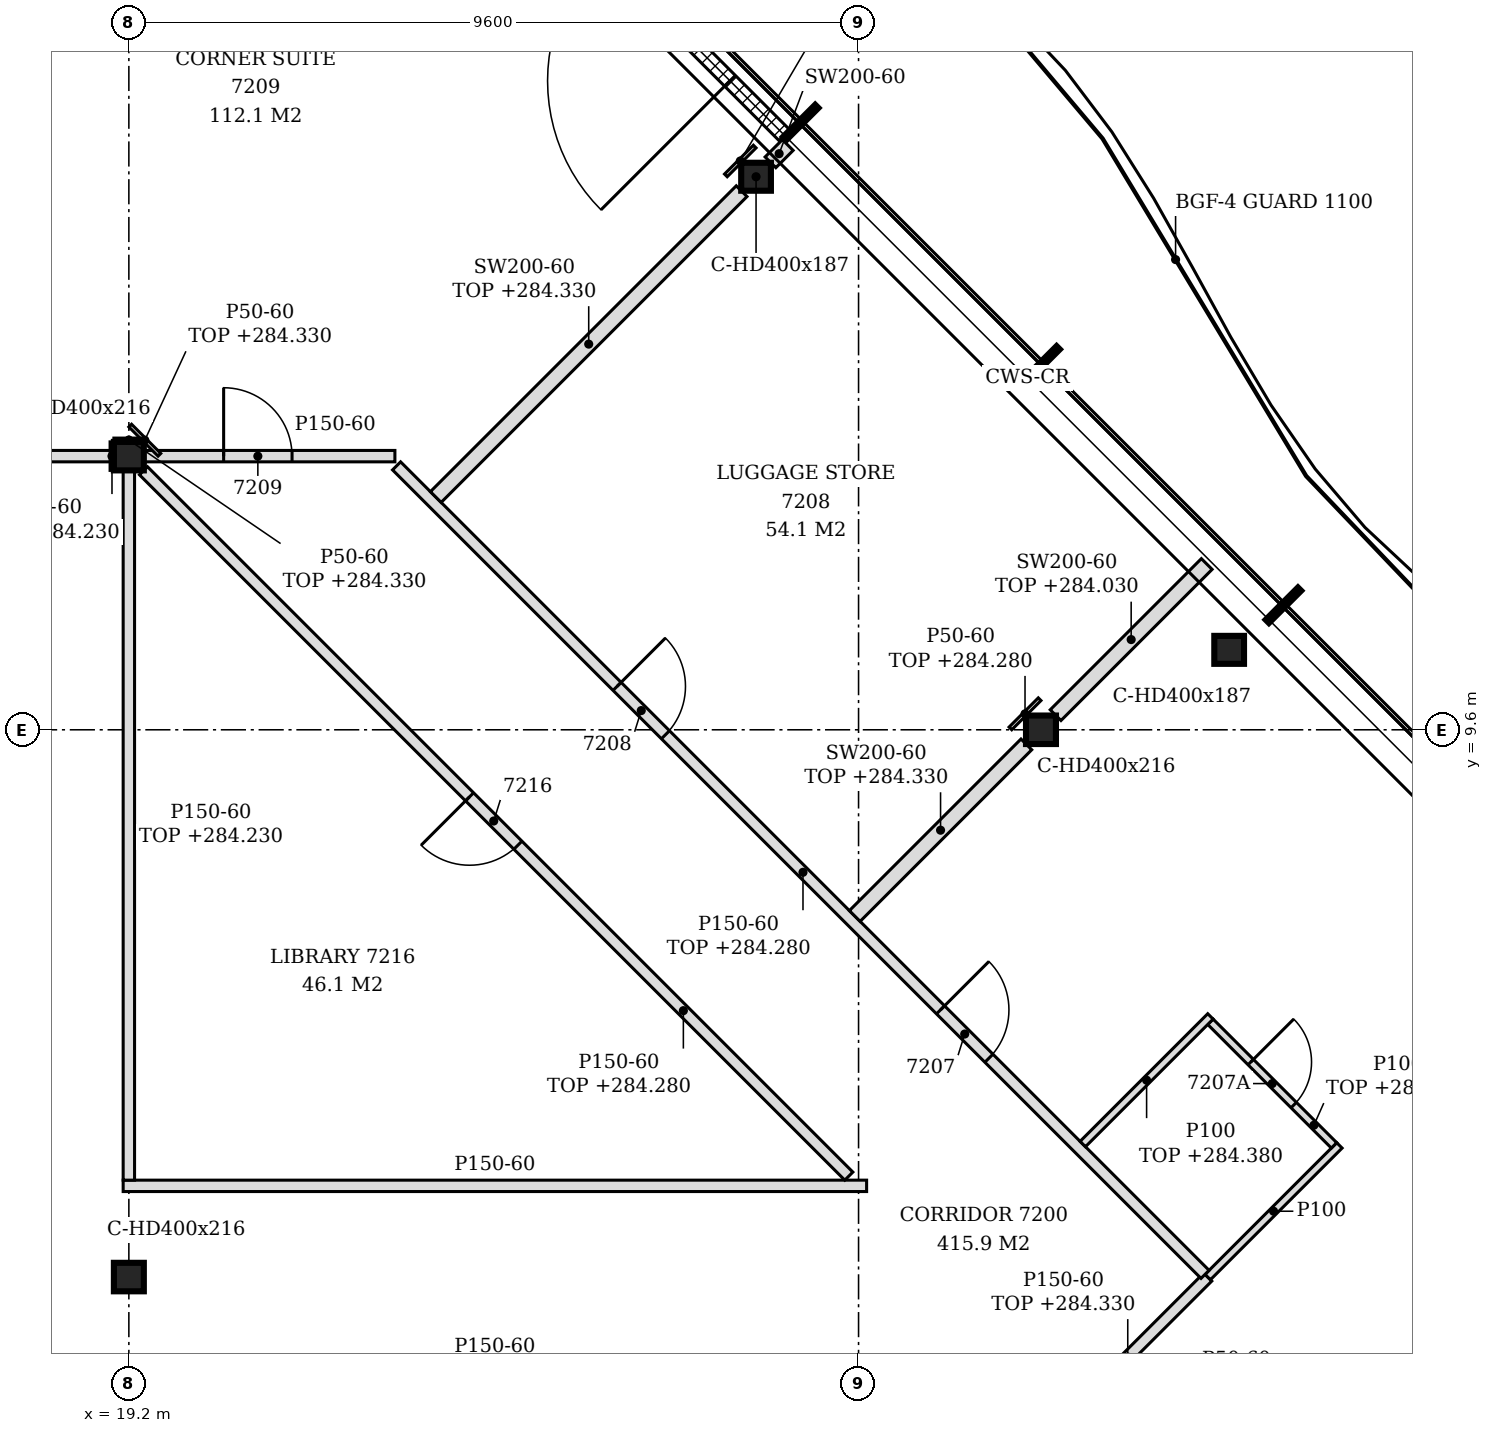
"""IFC4 building model, lengths in metres.
Left out: names, types, materials, properties, quantities, classifications, styles, units other than length and angle.
Written with IfcOpenShell. Run it as: python <this file> out.ifc"""

import sys

from ifc_helpers import new_model, si_unit, direction, frame, frame_2d, origin, origin_2d, place, context, subcontext, project, spatial, polyline, rectangle, i_section, outline, extrude, element, fill, save


model = new_model("IFC4")
c1 = context("Model", 3, precision=1e-05, world=origin(), true_north=direction((0.0, 1.0)))
c2 = subcontext(c1, "Body", "Model", "MODEL_VIEW")
j1 = project(units=[si_unit("LENGTHUNIT", "METRE"), si_unit("PLANEANGLEUNIT", "RADIAN")], contexts=[c1])
p1 = place(None, origin())
s1 = spatial("IfcSite", under=j1, at=p1, CompositionType="ELEMENT")
p2 = place(p1, origin())
s2 = spatial("IfcBuilding", under=s1, at=p2, CompositionType="ELEMENT")
p3 = place(p2, frame((0.0, 0.0, 281.4)))
s3 = spatial("IfcBuildingStorey", under=s2, at=p3, CompositionType="ELEMENT", Elevation=281.4)
for number, where, z_axis, x_axis in (
    (1, (33.676, 10.652, -0.15), (0.0, 0.0, 1.0), (1.0, 0.0, 0.0)),
    (2, (27.451, 16.876, -0.15), (0.0, 0.0, 1.0), (1.0, 0.0, 0.0)),
):
    element("IfcColumn", number, at=place(p3, frame(where, z_axis=z_axis, x_axis=x_axis)), inside=s3, PredefinedType="COLUMN", context=c2, shape_type="SweptSolid", body=[
        extrude(i_section(OverallWidth=0.391, OverallDepth=0.368, WebThickness=0.015, FlangeThickness=0.024, FilletRadius=0.015, at=origin_2d()), origin(), (0.0, 0.0, 1.0), 3.6),
    ])
for number, where, z_axis, x_axis in (
    (3, (19.2, 2.4, -0.15), (0.0, 0.0, 1.0), (1.0, 0.0, 0.0)),
    (4, (19.2, 13.2, -0.15), (0.0, 0.0, 1.0), (1.0, 0.0, 0.0)),
    (5, (31.2, 9.6, -0.15), (0.0, 0.0, 1.0), (1.0, 0.0, 0.0)),
):
    element("IfcColumn", number, at=place(p3, frame(where, z_axis=z_axis, x_axis=x_axis)), inside=s3, PredefinedType="COLUMN", context=c2, shape_type="SweptSolid", body=[
        extrude(i_section(OverallWidth=0.394, OverallDepth=0.375, WebThickness=0.017, FlangeThickness=0.028, FilletRadius=0.015, at=origin_2d()), origin(), (0.0, 0.0, 1.0), 3.6),
    ])
p4 = place(p3, frame((27.826, 17.42, 0.0), z_axis=(0.0, 0.0, 1.0), x_axis=(-0.707079231393, 0.707134329907, 0.0)))
e6 = element("IfcWall", 6, at=p4, inside=s3, PredefinedType="NOTDEFINED", context=c2, shape_type="SweptSolid", body=[
    extrude(rectangle(XDim=4.431, YDim=0.2, at=frame_2d((2.215, 0.0))), origin(), (0.0, 0.0, 1.0), 3.45),
])
p5 = place(p4, frame((1.015, 0.0, 0.0)))
e7 = element("IfcOpeningElement", 7, at=p5, cuts=e6, PredefinedType="OPENING", context=c2, shape_type="SweptSolid", body=[
    extrude(rectangle(XDim=2.4, YDim=2.4, at=frame_2d((1.2, 1.2))), frame((0.0, 0.11, 0.0), z_axis=(0.0, -1.0, 0.0), x_axis=(1.0, 0.0, 0.0)), (0.0, 0.0, 1.0), 0.22),
])
p6 = place(p3, frame((31.289, 0.295, 0.0), z_axis=(0.0, 0.0, 1.0), x_axis=(0.707147793093, 0.707065766902, 0.0)))
e8 = element("IfcWall", 8, at=p6, inside=s3, PredefinedType="PARTITIONING", context=c2, shape_type="SweptSolid", body=[
    extrude(rectangle(XDim=2.976, YDim=0.15, at=frame_2d((1.488, 0.0))), origin(), (0.0, 0.0, 1.0), 2.93),
])
p7 = place(p3, frame((33.394, 2.4, 0.0), z_axis=(0.0, 0.0, 1.0), x_axis=(0.707056951598, 0.707156607264, 0.0)))
e9 = element("IfcWall", 9, at=p7, inside=s3, PredefinedType="PARTITIONING", context=c2, shape_type="SweptSolid", body=[
    extrude(rectangle(XDim=2.45, YDim=0.1, at=frame_2d((1.225, 0.0))), origin(), (0.0, 0.0, 1.0), 3.45),
])
p8 = place(p3, frame((33.359, 2.435, 0.0), z_axis=(0.0, 0.0, 1.0), x_axis=(-0.707098666068, 0.707114896212, 0.0)))
e10 = element("IfcWall", 10, at=p8, inside=s3, PredefinedType="PARTITIONING", context=c2, shape_type="SweptSolid", body=[
    extrude(rectangle(XDim=15.042, YDim=0.15, at=frame_2d((7.521, 0.0))), origin(), (0.0, 0.0, 1.0), 2.88),
])
p9 = place(p8, frame((4.021, 0.0, 0.0)))
e11 = element("IfcOpeningElement", 11, at=p9, cuts=e10, PredefinedType="OPENING", context=c2, shape_type="SweptSolid", body=[
    extrude(rectangle(XDim=0.9, YDim=2.1, at=frame_2d((0.45, 1.05))), frame((0.0, 0.085, 0.0), z_axis=(0.0, -1.0, 0.0), x_axis=(1.0, 0.0, 0.0)), (0.0, 0.0, 1.0), 0.17),
])
p10 = place(p8, frame((10.04, 0.0, 0.0)))
e12 = element("IfcOpeningElement", 12, at=p10, cuts=e10, PredefinedType="OPENING", context=c2, shape_type="SweptSolid", body=[
    extrude(rectangle(XDim=0.9, YDim=2.1, at=frame_2d((0.45, 1.05))), frame((0.0, 0.085, 0.0), z_axis=(0.0, -1.0, 0.0), x_axis=(1.0, 0.0, 0.0)), (0.0, 0.0, 1.0), 0.17),
])
p11 = place(p3, frame((19.125, 3.6, 0.0), z_axis=(0.0, 0.0, 1.0), x_axis=(1.0, 0.0, 0.0)))
e13 = element("IfcWall", 13, at=p11, inside=s3, PredefinedType="PARTITIONING", context=c2, shape_type="SweptSolid", body=[
    extrude(outline(polyline([(0.0, 0.0), (9.781, 0.0), (9.781, 3.45), (0.225, 3.45), (0.223, 2.83), (0.0, 2.83), (0.0, 0.0)])), frame((0.0, 0.075, 0.0), z_axis=(0.0, -1.0, 0.0), x_axis=(1.0, 0.0, 0.0)), (0.0, 0.0, 1.0), 0.15),
])
p12 = place(p3, frame((19.2, 3.675, 0.0), z_axis=(0.0, 0.0, 1.0), x_axis=(0.0, 1.0, 0.0)))
e14 = element("IfcWall", 14, at=p12, inside=s3, PredefinedType="PARTITIONING", context=c2, shape_type="SweptSolid", body=[
    extrude(rectangle(XDim=9.337, YDim=0.15, at=frame_2d((4.669, 0.0))), origin(), (0.0, 0.0, 1.0), 2.83),
])
p13 = place(p3, frame((28.672, 3.728, 0.0), z_axis=(0.0, 0.0, 1.0), x_axis=(-0.707106781187, 0.707106781187, 0.0)))
e15 = element("IfcWall", 15, at=p13, inside=s3, PredefinedType="PARTITIONING", context=c2, shape_type="SweptSolid", body=[
    extrude(rectangle(XDim=13.124, YDim=0.15, at=frame_2d((6.562, 0.0))), origin(), (0.0, 0.0, 1.0), 2.88),
])
p14 = place(p13, frame((6.157, 0.0, 0.0)))
e16 = element("IfcOpeningElement", 16, at=p14, cuts=e15, PredefinedType="OPENING", context=c2, shape_type="SweptSolid", body=[
    extrude(rectangle(XDim=0.9, YDim=2.1, at=frame_2d((0.45, 1.05))), frame((0.0, 0.085, 0.0), z_axis=(0.0, -1.0, 0.0), x_axis=(1.0, 0.0, 0.0)), (0.0, 0.0, 1.0), 0.17),
])
p15 = place(p3, frame((35.056, 4.132, 0.0), z_axis=(0.0, 0.0, 1.0), x_axis=(-0.707106781187, 0.707106781187, 0.0)))
e17 = element("IfcWall", 17, at=p15, inside=s3, PredefinedType="PARTITIONING", context=c2, shape_type="SweptSolid", body=[
    extrude(rectangle(XDim=2.3, YDim=0.1, at=frame_2d((1.15, 0.0))), origin(), (0.0, 0.0, 1.0), 2.98),
])
p16 = place(p15, frame((0.75, 0.0, 0.0)))
e18 = element("IfcOpeningElement", 18, at=p16, cuts=e17, PredefinedType="OPENING", context=c2, shape_type="SweptSolid", body=[
    extrude(rectangle(XDim=0.8, YDim=2.1, at=frame_2d((0.4, 1.05))), frame((0.0, 0.06, 0.0), z_axis=(0.0, -1.0, 0.0), x_axis=(1.0, 0.0, 0.0)), (0.0, 0.0, 1.0), 0.12),
])
p17 = place(p3, frame((31.75, 4.15, 0.0), z_axis=(0.0, 0.0, 1.0), x_axis=(0.707055379538, 0.707158179099, 0.0)))
e19 = element("IfcWall", 19, at=p17, inside=s3, PredefinedType="PARTITIONING", context=c2, shape_type="SweptSolid", body=[
    extrude(rectangle(XDim=2.375, YDim=0.1, at=frame_2d((1.188, 0.0))), origin(), (0.0, 0.0, 1.0), 2.98),
])
p18 = place(p3, frame((28.75, 7.15, 0.0), z_axis=(0.0, 0.0, 1.0), x_axis=(0.707106781187, 0.707106781187, 0.0)))
e20 = element("IfcWall", 20, at=p18, inside=s3, PredefinedType="PARTITIONING", context=c2, shape_type="SweptSolid", body=[
    extrude(rectangle(XDim=3.193, YDim=0.2, at=frame_2d((1.597, 0.0))), origin(), (0.0, 0.0, 1.0), 2.93),
])
p19 = place(p3, frame((31.392, 9.792, 0.0), z_axis=(0.0, 0.0, 1.0), x_axis=(0.707106781187, 0.707106781187, 0.0)))
e21 = element("IfcWall", 21, at=p19, inside=s3, PredefinedType="PARTITIONING", context=c2, shape_type="SweptSolid", body=[
    extrude(rectangle(XDim=2.812, YDim=0.2, at=frame_2d((1.406, 0.0))), origin(), (0.0, 0.0, 1.0), 2.63),
])
p20 = place(p3, frame((23.238, 12.662, 0.0), z_axis=(0.0, 0.0, 1.0), x_axis=(0.707106781187, 0.707106781187, 0.0)))
e22 = element("IfcWall", 22, at=p20, inside=s3, PredefinedType="PARTITIONING", context=c2, shape_type="SweptSolid", body=[
    extrude(rectangle(XDim=5.69, YDim=0.2, at=frame_2d((2.845, 0.0))), origin(), (0.0, 0.0, 1.0), 2.93),
])
p21 = place(p3, frame((7.397, 13.2, 0.0), z_axis=(0.0, 0.0, 1.0), x_axis=(1.0, 0.0, 0.0)))
e23 = element("IfcWall", 23, at=p21, inside=s3, PredefinedType="PARTITIONING", context=c2, shape_type="SweptSolid", body=[
    extrude(rectangle(XDim=11.606, YDim=0.15, at=frame_2d((5.803, 0.0))), origin(), (0.0, 0.0, 1.0), 2.83),
])
p22 = place(p3, frame((19.397, 13.2, 0.0), z_axis=(0.0, 0.0, 1.0), x_axis=(1.0, 0.0, 0.0)))
e24 = element("IfcWall", 24, at=p22, inside=s3, PredefinedType="PARTITIONING", context=c2, shape_type="SweptSolid", body=[
    extrude(rectangle(XDim=3.303, YDim=0.15, at=frame_2d((1.652, 0.0))), origin(), (0.0, 0.0, 1.0), 3.45),
])
p23 = place(p22, frame((1.05, 0.0, 0.0)))
e25 = element("IfcOpeningElement", 25, at=p23, cuts=e24, PredefinedType="OPENING", context=c2, shape_type="SweptSolid", body=[
    extrude(rectangle(XDim=0.9, YDim=2.1, at=frame_2d((0.45, 1.05))), frame((0.0, 0.085, 0.0), z_axis=(0.0, -1.0, 0.0), x_axis=(1.0, 0.0, 0.0)), (0.0, 0.0, 1.0), 0.17),
])
p24 = place(p3, frame((27.641, 17.065, 0.0), z_axis=(0.0, 0.0, 1.0), x_axis=(0.707106781187, 0.707106781187, 0.0)))
e26 = element("IfcWall", 26, at=p24, inside=s3, PredefinedType="PARTITIONING", context=c2, shape_type="SweptSolid", body=[
    extrude(rectangle(XDim=0.322, YDim=0.2, at=frame_2d((0.161, 0.0))), origin(), (0.0, 0.0, 1.0), 3.45),
])
p25 = place(p3, frame((18.978, 13.012, 0.0), z_axis=(0.0, 0.0, 1.0), x_axis=(0.0, 1.0, 0.0)))
e27 = element("IfcWall", 27, at=p25, inside=s3, PredefinedType="PARTITIONING", context=c2, shape_type="SweptSolid", body=[
    extrude(rectangle(XDim=0.375, YDim=0.05, at=frame_2d((0.188, 0.0))), origin(), (0.0, 0.0, 1.0), 2.83),
])
p26 = place(p3, frame((19.602, 13.218, 0.0), z_axis=(0.0, 0.0, 1.0), x_axis=(-0.707106781187, 0.707106781187, 0.0)))
e28 = element("IfcWall", 28, at=p26, inside=s3, PredefinedType="PARTITIONING", context=c2, shape_type="SweptSolid", body=[
    extrude(rectangle(XDim=0.544, YDim=0.05, at=frame_2d((0.272, 0.0))), origin(), (0.0, 0.0, 1.0), 2.93),
])
p27 = place(p3, frame((30.798, 9.618, 0.0), z_axis=(0.0, 0.0, 1.0), x_axis=(0.707106781187, 0.707106781187, 0.0)))
e29 = element("IfcWall", 29, at=p27, inside=s3, PredefinedType="PARTITIONING", context=c2, shape_type="SweptSolid", body=[
    extrude(rectangle(XDim=0.544, YDim=0.05, at=frame_2d((0.272, 0.0))), origin(), (0.0, 0.0, 1.0), 2.88),
])
p28 = place(p3, frame((27.054, 16.893, 0.0), z_axis=(0.0, 0.0, 1.0), x_axis=(0.707106781187, 0.707106781187, 0.0)))
e30 = element("IfcWall", 30, at=p28, inside=s3, PredefinedType="PARTITIONING", context=c2, shape_type="SweptSolid", body=[
    extrude(rectangle(XDim=0.537, YDim=0.05, at=frame_2d((0.269, 0.0))), origin(), (0.0, 0.0, 1.0), 2.93),
])
p29 = place(p3, frame((19.003, 13.413, 0.0), z_axis=(0.0, 0.0, 1.0), x_axis=(1.0, 0.0, 0.0)))
e31 = element("IfcWall", 31, at=p29, inside=s3, PredefinedType="PARTITIONING", context=c2, shape_type="SweptSolid", body=[
    extrude(rectangle(XDim=0.394, YDim=0.05, at=frame_2d((0.197, 0.0))), origin(), (0.0, 0.0, 1.0), 2.93),
])
p30 = place(p5, origin())
e32 = element("IfcDoor", 32, at=p30, inside=s3, OperationType="SINGLE_SWING_LEFT", PredefinedType="DOOR", context=c2, shape_type="SweptSolid", body=[
    extrude(rectangle(XDim=2.4, YDim=2.4, at=frame_2d((1.2, 1.2))), frame((0.0, 0.025, 0.0), z_axis=(0.0, -1.0, 0.0), x_axis=(1.0, 0.0, 0.0)), (0.0, 0.0, 1.0), 0.05),
])
fill(e7, e32)
p31 = place(p9, frame((0.9, 0.0, 0.0), z_axis=(0.0, 0.0, 1.0), x_axis=(-1.0, 0.0, 0.0)))
e33 = element("IfcDoor", 33, at=p31, inside=s3, OperationType="SINGLE_SWING_LEFT", PredefinedType="DOOR", context=c2, shape_type="SweptSolid", body=[
    extrude(rectangle(XDim=0.9, YDim=2.1, at=frame_2d((0.45, 1.05))), frame((0.0, 0.025, 0.0), z_axis=(0.0, -1.0, 0.0), x_axis=(1.0, 0.0, 0.0)), (0.0, 0.0, 1.0), 0.05),
])
fill(e11, e33)
p32 = place(p16, frame((0.8, 0.0, 0.0), z_axis=(0.0, 0.0, 1.0), x_axis=(-1.0, 0.0, 0.0)))
e34 = element("IfcDoor", 34, at=p32, inside=s3, OperationType="SINGLE_SWING_LEFT", PredefinedType="DOOR", context=c2, shape_type="SweptSolid", body=[
    extrude(rectangle(XDim=0.8, YDim=2.1, at=frame_2d((0.4, 1.05))), frame((0.0, 0.025, 0.0), z_axis=(0.0, -1.0, 0.0), x_axis=(1.0, 0.0, 0.0)), (0.0, 0.0, 1.0), 0.05),
])
fill(e18, e34)
p33 = place(p10, frame((0.9, 0.0, 0.0), z_axis=(0.0, 0.0, 1.0), x_axis=(-1.0, 0.0, 0.0)))
e35 = element("IfcDoor", 35, at=p33, inside=s3, OperationType="SINGLE_SWING_LEFT", PredefinedType="DOOR", context=c2, shape_type="SweptSolid", body=[
    extrude(rectangle(XDim=0.9, YDim=2.1, at=frame_2d((0.45, 1.05))), frame((0.0, 0.025, 0.0), z_axis=(0.0, -1.0, 0.0), x_axis=(1.0, 0.0, 0.0)), (0.0, 0.0, 1.0), 0.05),
])
fill(e12, e35)
p34 = place(p23, origin())
e36 = element("IfcDoor", 36, at=p34, inside=s3, OperationType="SINGLE_SWING_LEFT", PredefinedType="DOOR", context=c2, shape_type="SweptSolid", body=[
    extrude(rectangle(XDim=0.9, YDim=2.1, at=frame_2d((0.45, 1.05))), frame((0.0, 0.025, 0.0), z_axis=(0.0, -1.0, 0.0), x_axis=(1.0, 0.0, 0.0)), (0.0, 0.0, 1.0), 0.05),
])
fill(e25, e36)
p35 = place(p14, origin())
e37 = element("IfcDoor", 37, at=p35, inside=s3, OperationType="SINGLE_SWING_RIGHT", PredefinedType="DOOR", context=c2, shape_type="SweptSolid", body=[
    extrude(rectangle(XDim=0.9, YDim=2.1, at=frame_2d((0.45, 1.05))), frame((0.0, 0.025, 0.0), z_axis=(0.0, -1.0, 0.0), x_axis=(1.0, 0.0, 0.0)), (0.0, 0.0, 1.0), 0.05),
])
fill(e16, e37)
save(model, sys.argv[1])
